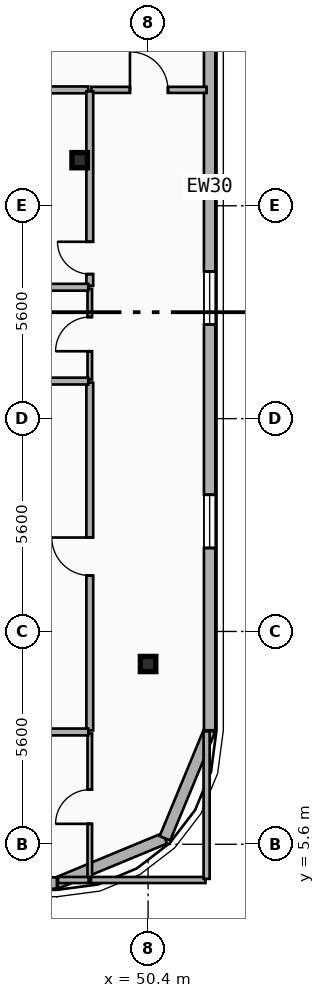
"""IFC4 building model, lengths in metres.
Left out: names, types, materials, properties, quantities, classifications, styles, units other than length and angle.
Written with IfcOpenShell. Run it as: python <this file> out.ifc"""

import sys

from ifc_helpers import new_model, si_unit, direction, frame, frame_2d, origin, origin_2d, place, context, subcontext, project, spatial, rectangle, i_section, extrude, element, fill, save


model = new_model("IFC4")
c1 = context("Model", 3, precision=1e-05, world=origin(), true_north=direction((0.0, 1.0)))
c2 = subcontext(c1, "Body", "Model", "MODEL_VIEW")
j1 = project(units=[si_unit("LENGTHUNIT", "METRE"), si_unit("PLANEANGLEUNIT", "RADIAN")], contexts=[c1])
p1 = place(None, origin())
s1 = spatial("IfcSite", under=j1, at=p1, CompositionType="ELEMENT")
p2 = place(p1, origin())
s2 = spatial("IfcBuilding", under=s1, at=p2, CompositionType="ELEMENT")
p3 = place(p2, frame((0.0, 0.0, 193.2)))
s3 = spatial("IfcBuildingStorey", under=s2, at=p3, CompositionType="ELEMENT", Elevation=193.2)
p4 = place(p3, frame((48.6, 23.6, 0.0), z_axis=(0.0, 0.0, 1.0), x_axis=(1.0, 0.0, 0.0)))
e1 = element("IfcColumn", 1, at=p4, inside=s3, PredefinedType="COLUMN", context=c2, shape_type="SweptSolid", body=[
    extrude(i_section(OverallWidth=0.408, OverallDepth=0.4, WebThickness=0.025, FlangeThickness=0.039, FilletRadius=0.015, at=origin_2d()), origin(), (0.0, 0.0, 1.0), 3.6),
])
p5 = place(p3, frame((50.4, 10.439, 0.0), z_axis=(0.0, -0.079901051777, 0.996802799918), x_axis=(1.0, 0.0, 0.0)))
e2 = element("IfcColumn", 2, at=p5, inside=s3, PredefinedType="COLUMN", context=c2, shape_type="SweptSolid", body=[
    extrude(i_section(OverallWidth=0.408, OverallDepth=0.4, WebThickness=0.025, FlangeThickness=0.039, FilletRadius=0.015, at=origin_2d()), origin(), (0.0, 0.0, 1.0), 3.612),
])
p6 = place(p3, frame((50.843, 5.757, 0.0), z_axis=(0.0, 0.0, 1.0), x_axis=(-0.92389884758, -0.382636798336, 0.0)))
e3 = element("IfcWall", 3, at=p6, inside=s3, PredefinedType="SOLIDWALL", context=c2, shape_type="SweptSolid", body=[
    extrude(rectangle(XDim=3.077, YDim=0.3, at=frame_2d((1.538, 0.0))), origin(), (0.0, 0.0, 1.0), 3.34),
])
p7 = place(p3, frame((52.02, 8.6, 0.0), z_axis=(0.0, 0.0, 1.0), x_axis=(-0.382676475685, -0.923882414032, 0.0)))
e4 = element("IfcWall", 4, at=p7, inside=s3, PredefinedType="SOLIDWALL", context=c2, shape_type="SweptSolid", body=[
    extrude(rectangle(XDim=3.077, YDim=0.3, at=frame_2d((1.539, 0.0))), origin(), (0.0, 0.0, 1.0), 3.34),
])
p8 = place(p3, frame((52.02, 37.2, 0.0), z_axis=(0.0, 0.0, 1.0), x_axis=(0.0, -1.0, 0.0)))
e5 = element("IfcWall", 5, at=p8, inside=s3, PredefinedType="SOLIDWALL", context=c2, shape_type="SweptSolid", body=[
    extrude(rectangle(XDim=28.6, YDim=0.3, at=frame_2d((14.3, 0.0))), origin(), (0.0, 0.0, 1.0), 3.34),
])
p9 = place(p8, frame((2.38, 0.0, 0.34)))
e6 = element("IfcOpeningElement", 6, at=p9, cuts=e5, PredefinedType="OPENING", context=c2, shape_type="SweptSolid", body=[
    extrude(rectangle(XDim=1.4, YDim=2.1, at=frame_2d((0.7, 1.05))), frame((0.0, 0.16, 0.0), z_axis=(0.0, -1.0, 0.0), x_axis=(1.0, 0.0, 0.0)), (0.0, 0.0, 1.0), 0.32),
])
p10 = place(p8, frame((5.84, 0.0, 0.34)))
e7 = element("IfcOpeningElement", 7, at=p10, cuts=e5, PredefinedType="OPENING", context=c2, shape_type="SweptSolid", body=[
    extrude(rectangle(XDim=1.4, YDim=2.1, at=frame_2d((0.7, 1.05))), frame((0.0, 0.16, 0.0), z_axis=(0.0, -1.0, 0.0), x_axis=(1.0, 0.0, 0.0)), (0.0, 0.0, 1.0), 0.32),
])
p11 = place(p8, frame((16.527, 0.0, 0.34)))
e8 = element("IfcOpeningElement", 8, at=p11, cuts=e5, PredefinedType="OPENING", context=c2, shape_type="SweptSolid", body=[
    extrude(rectangle(XDim=1.4, YDim=2.1, at=frame_2d((0.7, 1.05))), frame((0.0, 0.16, 0.0), z_axis=(0.0, -1.0, 0.0), x_axis=(1.0, 0.0, 0.0)), (0.0, 0.0, 1.0), 0.32),
])
p12 = place(p8, frame((22.403, 0.0, 0.34)))
e9 = element("IfcOpeningElement", 9, at=p12, cuts=e5, PredefinedType="OPENING", context=c2, shape_type="SweptSolid", body=[
    extrude(rectangle(XDim=1.4, YDim=2.1, at=frame_2d((0.7, 1.05))), frame((0.0, 0.16, 0.0), z_axis=(0.0, -1.0, 0.0), x_axis=(1.0, 0.0, 0.0)), (0.0, 0.0, 1.0), 0.32),
])
p13 = place(p3, frame((48.0, 4.58, 0.0), z_axis=(0.0, 0.0, 1.0), x_axis=(-1.0, 0.0, 0.0)))
e10 = element("IfcWall", 10, at=p13, inside=s3, PredefinedType="SOLIDWALL", context=c2, shape_type="SweptSolid", body=[
    extrude(rectangle(XDim=38.4, YDim=0.3, at=frame_2d((19.2, 0.0))), origin(), (0.0, 0.0, 1.0), 3.34),
])
p14 = place(p13, frame((36.19, 0.0, 0.8)))
e11 = element("IfcOpeningElement", 11, at=p14, cuts=e10, PredefinedType="OPENING", context=c2, shape_type="SweptSolid", body=[
    extrude(rectangle(XDim=1.8, YDim=1.8, at=frame_2d((0.9, 0.9))), frame((0.0, 0.16, 0.0), z_axis=(0.0, -1.0, 0.0), x_axis=(1.0, 0.0, 0.0)), (0.0, 0.0, 1.0), 0.32),
])
p15 = place(p13, frame((29.712, 0.0, 0.7)))
e12 = element("IfcOpeningElement", 12, at=p15, cuts=e10, PredefinedType="OPENING", context=c2, shape_type="SweptSolid", body=[
    extrude(rectangle(XDim=2.0, YDim=2.2, at=frame_2d((1.0, 1.1))), frame((0.0, 0.16, 0.0), z_axis=(0.0, -1.0, 0.0), x_axis=(1.0, 0.0, 0.0)), (0.0, 0.0, 1.0), 0.32),
])
p16 = place(p13, frame((33.038, 0.0, 0.7)))
e13 = element("IfcOpeningElement", 13, at=p16, cuts=e10, PredefinedType="OPENING", context=c2, shape_type="SweptSolid", body=[
    extrude(rectangle(XDim=2.0, YDim=2.2, at=frame_2d((1.0, 1.1))), frame((0.0, 0.16, 0.0), z_axis=(0.0, -1.0, 0.0), x_axis=(1.0, 0.0, 0.0)), (0.0, 0.0, 1.0), 0.32),
])
p17 = place(p13, frame((20.0, 0.0, 0.7)))
e14 = element("IfcOpeningElement", 14, at=p17, cuts=e10, PredefinedType="OPENING", context=c2, shape_type="SweptSolid", body=[
    extrude(rectangle(XDim=2.0, YDim=2.2, at=frame_2d((1.0, 1.1))), frame((0.0, 0.16, 0.0), z_axis=(0.0, -1.0, 0.0), x_axis=(1.0, 0.0, 0.0)), (0.0, 0.0, 1.0), 0.32),
])
p18 = place(p13, frame((25.2, 0.0, 0.7)))
e15 = element("IfcOpeningElement", 15, at=p18, cuts=e10, PredefinedType="OPENING", context=c2, shape_type="SweptSolid", body=[
    extrude(rectangle(XDim=2.0, YDim=2.2, at=frame_2d((1.0, 1.1))), frame((0.0, 0.16, 0.0), z_axis=(0.0, -1.0, 0.0), x_axis=(1.0, 0.0, 0.0)), (0.0, 0.0, 1.0), 0.32),
])
p19 = place(p13, frame((13.4, 0.0, 0.7)))
e16 = element("IfcOpeningElement", 16, at=p19, cuts=e10, PredefinedType="OPENING", context=c2, shape_type="SweptSolid", body=[
    extrude(rectangle(XDim=2.0, YDim=2.2, at=frame_2d((1.0, 1.1))), frame((0.0, 0.16, 0.0), z_axis=(0.0, -1.0, 0.0), x_axis=(1.0, 0.0, 0.0)), (0.0, 0.0, 1.0), 0.32),
])
p20 = place(p13, frame((6.993, 0.0, 0.7)))
e17 = element("IfcOpeningElement", 17, at=p20, cuts=e10, PredefinedType="OPENING", context=c2, shape_type="SweptSolid", body=[
    extrude(rectangle(XDim=2.0, YDim=2.2, at=frame_2d((1.0, 1.1))), frame((0.0, 0.16, 0.0), z_axis=(0.0, -1.0, 0.0), x_axis=(1.0, 0.0, 0.0)), (0.0, 0.0, 1.0), 0.32),
])
p21 = place(p13, frame((3.469, 0.0, 0.7)))
e18 = element("IfcOpeningElement", 18, at=p21, cuts=e10, PredefinedType="OPENING", context=c2, shape_type="SweptSolid", body=[
    extrude(rectangle(XDim=2.0, YDim=2.2, at=frame_2d((1.0, 1.1))), frame((0.0, 0.16, 0.0), z_axis=(0.0, -1.0, 0.0), x_axis=(1.0, 0.0, 0.0)), (0.0, 0.0, 1.0), 0.32),
])
p22 = place(p13, frame((0.41, 0.0, 0.8)))
e19 = element("IfcOpeningElement", 19, at=p22, cuts=e10, PredefinedType="OPENING", context=c2, shape_type="SweptSolid", body=[
    extrude(rectangle(XDim=1.8, YDim=1.8, at=frame_2d((0.9, 0.9))), frame((0.0, 0.16, 0.0), z_axis=(0.0, -1.0, 0.0), x_axis=(1.0, 0.0, 0.0)), (0.0, 0.0, 1.0), 0.32),
])
p23 = place(p3, frame((48.906, 25.45, 0.0), z_axis=(0.0, 0.0, 1.0), x_axis=(1.0, 0.0, 0.0)))
e20 = element("IfcWall", 20, at=p23, inside=s3, PredefinedType="PARTITIONING", context=c2, shape_type="SweptSolid", body=[
    extrude(rectangle(XDim=3.034, YDim=0.16, at=frame_2d((1.517, 0.0))), origin(), (0.0, 0.0, 1.0), 2.67),
])
p24 = place(p23, frame((1.017, 0.0, 0.0)))
e21 = element("IfcOpeningElement", 21, at=p24, cuts=e20, PredefinedType="OPENING", context=c2, shape_type="SweptSolid", body=[
    extrude(rectangle(XDim=1.0, YDim=2.15, at=frame_2d((0.5, 1.075))), frame((0.0, 0.09, 0.0), z_axis=(0.0, -1.0, 0.0), x_axis=(1.0, 0.0, 0.0)), (0.0, 0.0, 1.0), 0.18),
])
p25 = place(p3, frame((45.44, 25.45, 0.0), z_axis=(0.0, 0.0, 1.0), x_axis=(1.0, 0.0, 0.0)))
e22 = element("IfcWall", 22, at=p25, inside=s3, PredefinedType="PLUMBINGWALL", context=c2, shape_type="SweptSolid", body=[
    extrude(rectangle(XDim=3.386, YDim=0.18, at=frame_2d((1.693, 0.0))), origin(), (0.0, 0.0, 1.0), 2.42),
])
p26 = place(p3, frame((48.866, 4.66, 0.0), z_axis=(0.0, 0.0, 1.0), x_axis=(0.0, 1.0, 0.0)))
e23 = element("IfcWall", 23, at=p26, inside=s3, PredefinedType="PARTITIONING", context=c2, shape_type="SweptSolid", body=[
    extrude(rectangle(XDim=3.855, YDim=0.12, at=frame_2d((1.927, 0.0))), origin(), (0.0, 0.0, 1.0), 3.34),
])
p27 = place(p26, frame((1.478, 0.0, 0.0)))
e24 = element("IfcOpeningElement", 24, at=p27, cuts=e23, PredefinedType="OPENING", context=c2, shape_type="SweptSolid", body=[
    extrude(rectangle(XDim=0.9, YDim=2.1, at=frame_2d((0.45, 1.05))), frame((0.0, 0.07, 0.0), z_axis=(0.0, -1.0, 0.0), x_axis=(1.0, 0.0, 0.0)), (0.0, 0.0, 1.0), 0.14),
])
p28 = place(p3, frame((48.866, 8.595, 0.0), z_axis=(0.0, 0.0, 1.0), x_axis=(0.0, 1.0, 0.0)))
e25 = element("IfcWall", 25, at=p28, inside=s3, PredefinedType="PLUMBINGWALL", context=c2, shape_type="SweptSolid", body=[
    extrude(rectangle(XDim=9.153, YDim=0.18, at=frame_2d((4.577, 0.0))), origin(), (0.0, 0.0, 1.0), 2.82),
])
p29 = place(p28, frame((4.076, 0.0, 0.0)))
e26 = element("IfcOpeningElement", 26, at=p29, cuts=e25, PredefinedType="OPENING", context=c2, shape_type="SweptSolid", body=[
    extrude(rectangle(XDim=1.0, YDim=2.15, at=frame_2d((0.5, 1.075))), frame((0.0, 0.1, 0.0), z_axis=(0.0, -1.0, 0.0), x_axis=(1.0, 0.0, 0.0)), (0.0, 0.0, 1.0), 0.2),
])
p30 = place(p3, frame((48.866, 17.828, 0.0), z_axis=(0.0, 0.0, 1.0), x_axis=(0.0, 1.0, 0.0)))
e27 = element("IfcWall", 27, at=p30, inside=s3, PredefinedType="PARTITIONING", context=c2, shape_type="SweptSolid", body=[
    extrude(rectangle(XDim=2.389, YDim=0.12, at=frame_2d((1.195, 0.0))), origin(), (0.0, 0.0, 1.0), 2.82),
])
p31 = place(p30, frame((0.744, 0.0, 0.0)))
e28 = element("IfcOpeningElement", 28, at=p31, cuts=e27, PredefinedType="OPENING", context=c2, shape_type="SweptSolid", body=[
    extrude(rectangle(XDim=0.9, YDim=2.1, at=frame_2d((0.45, 1.05))), frame((0.0, 0.07, 0.0), z_axis=(0.0, -1.0, 0.0), x_axis=(1.0, 0.0, 0.0)), (0.0, 0.0, 1.0), 0.14),
])
p32 = place(p3, frame((48.866, 20.297, 0.0), z_axis=(0.0, 0.0, 1.0), x_axis=(0.0, 1.0, 0.0)))
e29 = element("IfcWall", 29, at=p32, inside=s3, PredefinedType="PLUMBINGWALL", context=c2, shape_type="SweptSolid", body=[
    extrude(rectangle(XDim=5.113, YDim=0.18, at=frame_2d((2.556, 0.0))), origin(), (0.0, 0.0, 1.0), 2.82),
])
p33 = place(p32, frame((0.306, 0.0, 0.0)))
e30 = element("IfcOpeningElement", 30, at=p33, cuts=e29, PredefinedType="OPENING", context=c2, shape_type="SweptSolid", body=[
    extrude(rectangle(XDim=0.85, YDim=2.1, at=frame_2d((0.425, 1.05))), frame((0.0, 0.1, 0.0), z_axis=(0.0, -1.0, 0.0), x_axis=(1.0, 0.0, 0.0)), (0.0, 0.0, 1.0), 0.2),
])
for number, where, z_axis, x_axis in (
    (31, (45.44, 8.555, 0.0), (0.0, 0.0, 1.0), (1.0, 0.0, 0.0)),
    (32, (45.44, 17.788, 0.0), (0.0, 0.0, 1.0), (1.0, 0.0, 0.0)),
    (33, (45.44, 20.257, 0.0), (0.0, 0.0, 1.0), (1.0, 0.0, 0.0)),
):
    element("IfcWall", number, at=place(p3, frame(where, z_axis=z_axis, x_axis=x_axis)), inside=s3, PredefinedType="PLUMBINGWALL", context=c2, shape_type="SweptSolid", body=[
        extrude(rectangle(XDim=3.386, YDim=0.18, at=frame_2d((1.693, 0.0))), origin(), (0.0, 0.0, 1.0), 2.42),
    ])
p34 = place(p3, frame((48.896, 4.66, 0.0), z_axis=(0.0, 0.0, 1.0), x_axis=(1.0, 0.0, 0.0)))
e34 = element("IfcWall", 34, at=p34, inside=s3, PredefinedType="PARTITIONING", context=c2, shape_type="SweptSolid", body=[
    extrude(rectangle(XDim=3.014, YDim=0.16, at=frame_2d((1.507, 0.0))), origin(), (0.0, 0.0, 1.0), 3.34),
])
p35 = place(p3, frame((51.94, 4.69, 0.0), z_axis=(0.0, 0.0, 1.0), x_axis=(0.0, 1.0, 0.0)))
e35 = element("IfcWall", 35, at=p35, inside=s3, PredefinedType="PARTITIONING", context=c2, shape_type="SweptSolid", body=[
    extrude(rectangle(XDim=3.88, YDim=0.16, at=frame_2d((1.94, 0.0))), origin(), (0.0, 0.0, 1.0), 3.34),
])
p36 = place(p3, frame((48.03, 4.66, 0.0), z_axis=(0.0, 0.0, 1.0), x_axis=(1.0, 0.0, 0.0)))
e36 = element("IfcWall", 36, at=p36, inside=s3, PredefinedType="PARTITIONING", context=c2, shape_type="SweptSolid", body=[
    extrude(rectangle(XDim=0.806, YDim=0.16, at=frame_2d((0.403, 0.0))), origin(), (0.0, 0.0, 1.0), 3.34),
])
p37 = place(p11, origin())
e37 = element("IfcWindow", 37, at=p37, inside=s3, PartitioningType="SINGLE_PANEL", PredefinedType="WINDOW", context=c2, shape_type="SweptSolid", body=[
    extrude(rectangle(XDim=1.4, YDim=2.1, at=frame_2d((0.7, 1.05))), frame((0.0, 0.03, 0.0), z_axis=(0.0, -1.0, 0.0), x_axis=(1.0, 0.0, 0.0)), (0.0, 0.0, 1.0), 0.06),
])
fill(e8, e37)
p38 = place(p12, origin())
e38 = element("IfcWindow", 38, at=p38, inside=s3, PartitioningType="SINGLE_PANEL", PredefinedType="WINDOW", context=c2, shape_type="SweptSolid", body=[
    extrude(rectangle(XDim=1.4, YDim=2.1, at=frame_2d((0.7, 1.05))), frame((0.0, 0.03, 0.0), z_axis=(0.0, -1.0, 0.0), x_axis=(1.0, 0.0, 0.0)), (0.0, 0.0, 1.0), 0.06),
])
fill(e9, e38)
p39 = place(p24, origin())
e39 = element("IfcDoor", 39, at=p39, inside=s3, OperationType="SINGLE_SWING_LEFT", PredefinedType="DOOR", context=c2, shape_type="SweptSolid", body=[
    extrude(rectangle(XDim=1.0, YDim=2.15, at=frame_2d((0.5, 1.075))), frame((0.0, 0.025, 0.0), z_axis=(0.0, -1.0, 0.0), x_axis=(1.0, 0.0, 0.0)), (0.0, 0.0, 1.0), 0.05),
])
fill(e21, e39)
p40 = place(p27, origin())
e40 = element("IfcDoor", 40, at=p40, inside=s3, OperationType="SINGLE_SWING_LEFT", PredefinedType="DOOR", context=c2, shape_type="SweptSolid", body=[
    extrude(rectangle(XDim=0.9, YDim=2.1, at=frame_2d((0.45, 1.05))), frame((0.0, 0.025, 0.0), z_axis=(0.0, -1.0, 0.0), x_axis=(1.0, 0.0, 0.0)), (0.0, 0.0, 1.0), 0.05),
])
fill(e24, e40)
p41 = place(p29, origin())
e41 = element("IfcDoor", 41, at=p41, inside=s3, OperationType="SINGLE_SWING_RIGHT", PredefinedType="DOOR", context=c2, shape_type="SweptSolid", body=[
    extrude(rectangle(XDim=1.0, YDim=2.15, at=frame_2d((0.5, 1.075))), frame((0.0, 0.025, 0.0), z_axis=(0.0, -1.0, 0.0), x_axis=(1.0, 0.0, 0.0)), (0.0, 0.0, 1.0), 0.05),
])
fill(e26, e41)
p42 = place(p31, origin())
e42 = element("IfcDoor", 42, at=p42, inside=s3, OperationType="SINGLE_SWING_LEFT", PredefinedType="DOOR", context=c2, shape_type="SweptSolid", body=[
    extrude(rectangle(XDim=0.9, YDim=2.1, at=frame_2d((0.45, 1.05))), frame((0.0, 0.025, 0.0), z_axis=(0.0, -1.0, 0.0), x_axis=(1.0, 0.0, 0.0)), (0.0, 0.0, 1.0), 0.05),
])
fill(e28, e42)
p43 = place(p33, origin())
e43 = element("IfcDoor", 43, at=p43, inside=s3, OperationType="SINGLE_SWING_RIGHT", PredefinedType="DOOR", context=c2, shape_type="SweptSolid", body=[
    extrude(rectangle(XDim=0.85, YDim=2.1, at=frame_2d((0.425, 1.05))), frame((0.0, 0.025, 0.0), z_axis=(0.0, -1.0, 0.0), x_axis=(1.0, 0.0, 0.0)), (0.0, 0.0, 1.0), 0.05),
])
fill(e30, e43)
save(model, sys.argv[1])
